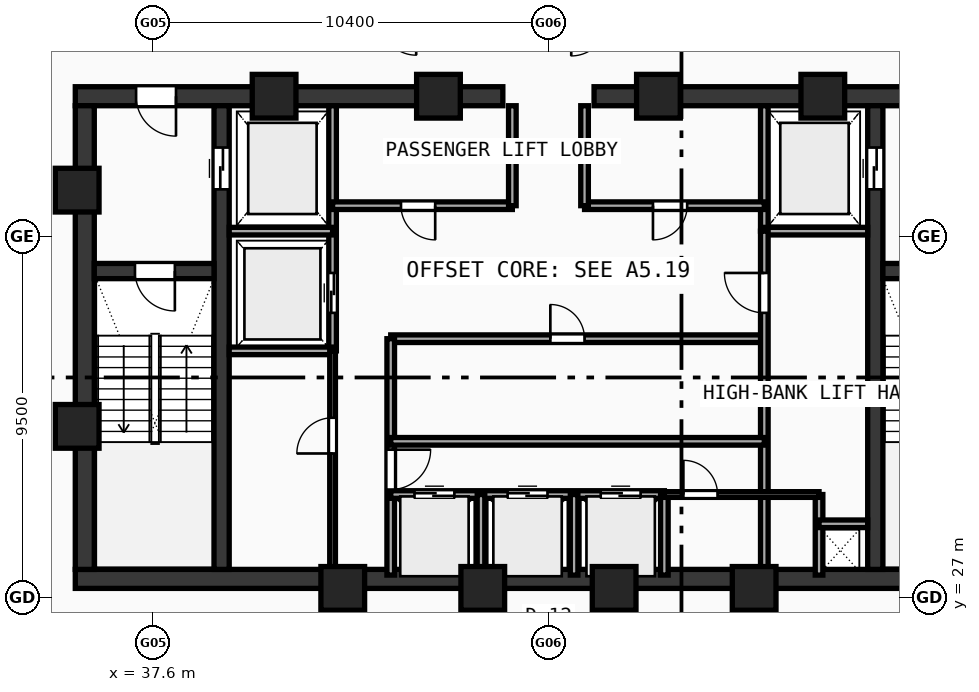
"""IFC4 building model, lengths in metres.
Left out: names, types, materials, properties, quantities, classifications, styles, units other than length and angle.
Written with IfcOpenShell. Run it as: python <this file> out.ifc"""

import sys

from ifc_helpers import new_model, si_unit, direction, frame, frame_2d, origin, origin_with_axes, origin_2d, place, context, subcontext, project, spatial, rectangle, hollow_rectangle, extrude, source, transform, mapped, element, fill, save


model = new_model("IFC4")
c1 = context("Model", 3, precision=1e-05, world=origin(), true_north=direction((0.0, 1.0)))
c2 = subcontext(c1, "Body", "Model", "MODEL_VIEW")
j1 = project(units=[si_unit("LENGTHUNIT", "METRE"), si_unit("PLANEANGLEUNIT", "RADIAN")], contexts=[c1])
p1 = place(None, origin())
s1 = spatial("IfcSite", under=j1, at=p1, CompositionType="ELEMENT")
p2 = place(p1, origin())
s2 = spatial("IfcBuilding", under=s1, at=p2, CompositionType="ELEMENT")
p3 = place(p2, frame((0.0, 0.0, 299.94)))
s3 = spatial("IfcBuildingStorey", under=s2, at=p3, CompositionType="ELEMENT", Elevation=299.94)
p4 = place(p3, frame((35.55, 27.5, 0.0), z_axis=(0.0, 0.0, 1.0), x_axis=(1.0, 0.0, 0.0)))
e1 = element("IfcWall", 1, at=p4, inside=s3, PredefinedType="SHEAR", context=c2, shape_type="SweptSolid", body=[
    extrude(rectangle(XDim=24.9, YDim=0.5, at=frame_2d((12.45, 0.0))), origin(), (0.0, 0.0, 1.0), 3.47),
])
p5 = place(p3, frame((35.55, 40.2, 0.0), z_axis=(0.0, 0.0, 1.0), x_axis=(1.0, 0.0, 0.0)))
e2 = element("IfcWall", 2, at=p5, inside=s3, PredefinedType="SHEAR", context=c2, shape_type="SweptSolid", body=[
    extrude(rectangle(XDim=11.25, YDim=0.5, at=frame_2d((5.625, 0.0))), origin(), (0.0, 0.0, 1.0), 3.47),
])
p6 = place(p5, frame((1.6, 0.0, 0.0)))
e3 = element("IfcOpeningElement", 3, at=p6, cuts=e2, PredefinedType="OPENING", context=c2, shape_type="SweptSolid", body=[
    extrude(rectangle(XDim=1.05, YDim=2.1, at=frame_2d((0.525, 1.05))), frame((0.0, 0.26, 0.0), z_axis=(0.0, -1.0, 0.0), x_axis=(1.0, 0.0, 0.0)), (0.0, 0.0, 1.0), 0.52),
])
p7 = place(p3, frame((49.2, 40.2, 0.0), z_axis=(0.0, 0.0, 1.0), x_axis=(1.0, 0.0, 0.0)))
e4 = element("IfcWall", 4, at=p7, inside=s3, PredefinedType="SHEAR", context=c2, shape_type="SweptSolid", body=[
    extrude(rectangle(XDim=11.25, YDim=0.5, at=frame_2d((5.625, 0.0))), origin(), (0.0, 0.0, 1.0), 3.47),
])
p8 = place(p7, frame((8.6, 0.0, 0.0)))
e5 = element("IfcOpeningElement", 5, at=p8, cuts=e4, PredefinedType="OPENING", context=c2, shape_type="SweptSolid", body=[
    extrude(rectangle(XDim=1.05, YDim=2.1, at=frame_2d((0.525, 1.05))), frame((0.0, 0.26, 0.0), z_axis=(0.0, -1.0, 0.0), x_axis=(1.0, 0.0, 0.0)), (0.0, 0.0, 1.0), 0.52),
])
p9 = place(p3, frame((35.8, 27.75, 0.0), z_axis=(0.0, 0.0, 1.0), x_axis=(0.0, 1.0, 0.0)))
e6 = element("IfcWall", 6, at=p9, inside=s3, PredefinedType="SHEAR", context=c2, shape_type="SweptSolid", body=[
    extrude(rectangle(XDim=12.2, YDim=0.5, at=frame_2d((6.1, 0.0))), origin(), (0.0, 0.0, 1.0), 3.47),
])
p10 = place(p3, frame((39.4, 27.75, 0.0), z_axis=(0.0, 0.0, 1.0), x_axis=(0.0, 1.0, 0.0)))
e7 = element("IfcWall", 7, at=p10, inside=s3, PredefinedType="SHEAR", context=c2, shape_type="SweptSolid", body=[
    extrude(rectangle(XDim=12.2, YDim=0.4, at=frame_2d((6.1, 0.0))), origin(), (0.0, 0.0, 1.0), 3.47),
])
p11 = place(p10, frame((10.0, 0.0, 0.0)))
e8 = element("IfcOpeningElement", 8, at=p11, cuts=e7, PredefinedType="OPENING", context=c2, shape_type="SweptSolid", body=[
    extrude(rectangle(XDim=1.1, YDim=2.1, at=frame_2d((0.55, 1.05))), frame((0.0, 0.21, 0.0), z_axis=(0.0, -1.0, 0.0), x_axis=(1.0, 0.0, 0.0)), (0.0, 0.0, 1.0), 0.42),
])
p12 = place(p3, frame((56.6, 27.75, 0.0), z_axis=(0.0, 0.0, 1.0), x_axis=(0.0, 1.0, 0.0)))
e9 = element("IfcWall", 9, at=p12, inside=s3, PredefinedType="SHEAR", context=c2, shape_type="SweptSolid", body=[
    extrude(rectangle(XDim=12.2, YDim=0.4, at=frame_2d((6.1, 0.0))), origin(), (0.0, 0.0, 1.0), 3.47),
])
p13 = place(p12, frame((10.0, 0.0, 0.0)))
e10 = element("IfcOpeningElement", 10, at=p13, cuts=e9, PredefinedType="OPENING", context=c2, shape_type="SweptSolid", body=[
    extrude(rectangle(XDim=1.1, YDim=2.1, at=frame_2d((0.55, 1.05))), frame((0.0, 0.21, 0.0), z_axis=(0.0, -1.0, 0.0), x_axis=(1.0, 0.0, 0.0)), (0.0, 0.0, 1.0), 0.42),
])
p14 = place(p3, frame((36.05, 35.6, 0.0), z_axis=(0.0, 0.0, 1.0), x_axis=(1.0, 0.0, 0.0)))
e11 = element("IfcWall", 11, at=p14, inside=s3, PredefinedType="SHEAR", context=c2, shape_type="SweptSolid", body=[
    extrude(rectangle(XDim=3.15, YDim=0.4, at=frame_2d((1.575, 0.0))), origin(), (0.0, 0.0, 1.0), 3.47),
])
p15 = place(p14, frame((1.07, 0.0, 0.0)))
e12 = element("IfcOpeningElement", 12, at=p15, cuts=e11, PredefinedType="OPENING", context=c2, shape_type="SweptSolid", body=[
    extrude(rectangle(XDim=1.05, YDim=2.1, at=frame_2d((0.525, 1.05))), frame((0.0, 0.21, 0.0), z_axis=(0.0, -1.0, 0.0), x_axis=(1.0, 0.0, 0.0)), (0.0, 0.0, 1.0), 0.42),
])
p16 = place(p3, frame((56.8, 35.6, 0.0), z_axis=(0.0, 0.0, 1.0), x_axis=(1.0, 0.0, 0.0)))
e13 = element("IfcWall", 13, at=p16, inside=s3, PredefinedType="SHEAR", context=c2, shape_type="SweptSolid", body=[
    extrude(rectangle(XDim=3.15, YDim=0.4, at=frame_2d((1.575, 0.0))), origin(), (0.0, 0.0, 1.0), 3.47),
])
p17 = place(p16, frame((1.02, 0.0, 0.0)))
e14 = element("IfcOpeningElement", 14, at=p17, cuts=e13, PredefinedType="OPENING", context=c2, shape_type="SweptSolid", body=[
    extrude(rectangle(XDim=1.05, YDim=2.1, at=frame_2d((0.525, 1.05))), frame((0.0, 0.21, 0.0), z_axis=(0.0, -1.0, 0.0), x_axis=(1.0, 0.0, 0.0)), (0.0, 0.0, 1.0), 0.42),
])
m1 = source(origin(), c2, "Body", "SweptSolid", [
    extrude(hollow_rectangle(XDim=1.15, YDim=1.15, WallThickness=0.048, at=origin_2d()), origin(), (0.0, 0.0, 1.0), 3.73),
])
for number, where, z_axis, x_axis in (
    (15, (42.588, 27.25, -0.26), (0.0, 0.0, 1.0), (1.0, 0.0, 0.0)),
    (16, (46.272, 27.25, -0.26), (0.0, 0.0, 1.0), (1.0, 0.0, 0.0)),
    (17, (49.729, 27.25, -0.26), (0.0, 0.0, 1.0), (1.0, 0.0, 0.0)),
    (18, (53.412, 27.25, -0.26), (0.0, 0.0, 1.0), (1.0, 0.0, 0.0)),
    (19, (55.219, 40.2, -0.26), (0.0, 0.0, 1.0), (1.0, 0.0, 0.0)),
    (20, (50.894, 40.2, -0.26), (0.0, 0.0, 1.0), (1.0, 0.0, 0.0)),
    (21, (45.106, 40.2, -0.26), (0.0, 0.0, 1.0), (1.0, 0.0, 0.0)),
    (22, (40.781, 40.2, -0.26), (0.0, 0.0, 1.0), (1.0, 0.0, 0.0)),
    (23, (35.6, 37.729, -0.26), (0.0, 0.0, 1.0), (1.0, 0.0, 0.0)),
    (24, (35.6, 31.513, -0.26), (0.0, 0.0, 1.0), (1.0, 0.0, 0.0)),
):
    element("IfcColumn", number, at=place(p3, frame(where, z_axis=z_axis, x_axis=x_axis)), inside=s3, PredefinedType="COLUMN", context=c2, shape_type="MappedRepresentation", body=[
        mapped(m1, transform((0.0, 0.0, 0.0), scale=1.0)),
    ])
p18 = place(p3, frame((42.32, 33.5, 0.0), z_axis=(0.0, 0.0, 1.0), x_axis=(0.0, 1.0, 0.0)))
e25 = element("IfcWall", 25, at=p18, inside=s3, PredefinedType="SOLIDWALL", context=c2, shape_type="SweptSolid", body=[
    extrude(rectangle(XDim=6.45, YDim=0.2, at=frame_2d((3.225, 0.0))), origin(), (0.0, 0.0, 1.0), 3.47),
])
p19 = place(p18, frame((1.0, 0.0, 0.0)))
e26 = element("IfcOpeningElement", 26, at=p19, cuts=e25, PredefinedType="OPENING", context=c2, shape_type="SweptSolid", body=[
    extrude(rectangle(XDim=1.05, YDim=2.1, at=frame_2d((0.525, 1.05))), frame((0.0, 0.11, 0.0), z_axis=(0.0, -1.0, 0.0), x_axis=(1.0, 0.0, 0.0)), (0.0, 0.0, 1.0), 0.22),
])
for number, where, z_axis, x_axis in (
    (27, (39.6, 36.65, 0.0), (0.0, 0.0, 1.0), (1.0, 0.0, 0.0)),
    (28, (39.6, 33.5, 0.0), (0.0, 0.0, 1.0), (1.0, 0.0, 0.0)),
):
    element("IfcWall", number, at=place(p3, frame(where, z_axis=z_axis, x_axis=x_axis)), inside=s3, PredefinedType="SOLIDWALL", context=c2, shape_type="SweptSolid", body=[
        extrude(rectangle(XDim=2.72, YDim=0.2, at=frame_2d((1.36, 0.0))), origin(), (0.0, 0.0, 1.0), 3.47),
    ])
p20 = place(p3, frame((53.68, 36.65, 0.0), z_axis=(0.0, 0.0, 1.0), x_axis=(0.0, 1.0, 0.0)))
e29 = element("IfcWall", 29, at=p20, inside=s3, PredefinedType="SOLIDWALL", context=c2, shape_type="SweptSolid", body=[
    extrude(rectangle(XDim=3.3, YDim=0.2, at=frame_2d((1.65, 0.0))), origin(), (0.0, 0.0, 1.0), 3.47),
])
p21 = place(p3, frame((53.68, 36.65, 0.0), z_axis=(0.0, 0.0, 1.0), x_axis=(1.0, 0.0, 0.0)))
e30 = element("IfcWall", 30, at=p21, inside=s3, PredefinedType="SOLIDWALL", context=c2, shape_type="SweptSolid", body=[
    extrude(rectangle(XDim=2.72, YDim=0.2, at=frame_2d((1.36, 0.0))), origin(), (0.0, 0.0, 1.0), 3.47),
])
p22 = place(p3, frame((42.32, 37.32, 0.0), z_axis=(0.0, 0.0, 1.0), x_axis=(1.0, 0.0, 0.0)))
e31 = element("IfcWall", 31, at=p22, inside=s3, PredefinedType="SOLIDWALL", context=c2, shape_type="SweptSolid", body=[
    extrude(rectangle(XDim=4.73, YDim=0.2, at=frame_2d((2.365, 0.0))), origin(), (0.0, 0.0, 1.0), 3.47),
])
p23 = place(p22, frame((1.8, 0.0, 0.0)))
e32 = element("IfcOpeningElement", 32, at=p23, cuts=e31, PredefinedType="OPENING", context=c2, shape_type="SweptSolid", body=[
    extrude(rectangle(XDim=0.9, YDim=2.1, at=frame_2d((0.45, 1.05))), frame((0.0, 0.11, 0.0), z_axis=(0.0, -1.0, 0.0), x_axis=(1.0, 0.0, 0.0)), (0.0, 0.0, 1.0), 0.22),
])
p24 = place(p3, frame((48.95, 37.32, 0.0), z_axis=(0.0, 0.0, 1.0), x_axis=(1.0, 0.0, 0.0)))
e33 = element("IfcWall", 33, at=p24, inside=s3, PredefinedType="SOLIDWALL", context=c2, shape_type="SweptSolid", body=[
    extrude(rectangle(XDim=4.73, YDim=0.2, at=frame_2d((2.365, 0.0))), origin(), (0.0, 0.0, 1.0), 3.47),
])
p25 = place(p24, frame((1.8, 0.0, 0.0)))
e34 = element("IfcOpeningElement", 34, at=p25, cuts=e33, PredefinedType="OPENING", context=c2, shape_type="SweptSolid", body=[
    extrude(rectangle(XDim=0.9, YDim=2.1, at=frame_2d((0.45, 1.05))), frame((0.0, 0.11, 0.0), z_axis=(0.0, -1.0, 0.0), x_axis=(1.0, 0.0, 0.0)), (0.0, 0.0, 1.0), 0.22),
])
for number, where, z_axis, x_axis in (
    (35, (47.05, 37.32, 0.0), (0.0, 0.0, 1.0), (0.0, 1.0, 0.0)),
    (36, (48.95, 37.32, 0.0), (0.0, 0.0, 1.0), (0.0, 1.0, 0.0)),
):
    element("IfcWall", number, at=place(p3, frame(where, z_axis=z_axis, x_axis=x_axis)), inside=s3, PredefinedType="SOLIDWALL", context=c2, shape_type="SweptSolid", body=[
        extrude(rectangle(XDim=2.63, YDim=0.2, at=frame_2d((1.315, 0.0))), origin(), (0.0, 0.0, 1.0), 3.47),
    ])
p26 = place(p3, frame((43.85, 33.82, 0.0), z_axis=(0.0, 0.0, 1.0), x_axis=(1.0, 0.0, 0.0)))
e37 = element("IfcWall", 37, at=p26, inside=s3, PredefinedType="SOLIDWALL", context=c2, shape_type="SweptSolid", body=[
    extrude(rectangle(XDim=9.83, YDim=0.2, at=frame_2d((4.915, 0.0))), origin(), (0.0, 0.0, 1.0), 3.47),
])
p27 = place(p26, frame((4.2, 0.0, 0.0)))
e38 = element("IfcOpeningElement", 38, at=p27, cuts=e37, PredefinedType="OPENING", context=c2, shape_type="SweptSolid", body=[
    extrude(rectangle(XDim=0.9, YDim=2.1, at=frame_2d((0.45, 1.05))), frame((0.0, 0.11, 0.0), z_axis=(0.0, -1.0, 0.0), x_axis=(1.0, 0.0, 0.0)), (0.0, 0.0, 1.0), 0.22),
])
p28 = place(p3, frame((43.85, 27.6, 0.0), z_axis=(0.0, 0.0, 1.0), x_axis=(0.0, 1.0, 0.0)))
e39 = element("IfcWall", 39, at=p28, inside=s3, PredefinedType="SOLIDWALL", context=c2, shape_type="SweptSolid", body=[
    extrude(rectangle(XDim=6.22, YDim=0.2, at=frame_2d((3.11, 0.0))), origin(), (0.0, 0.0, 1.0), 3.47),
])
p29 = place(p28, frame((2.25, 0.0, 0.0)))
e40 = element("IfcOpeningElement", 40, at=p29, cuts=e39, PredefinedType="OPENING", context=c2, shape_type="SweptSolid", body=[
    extrude(rectangle(XDim=1.05, YDim=2.1, at=frame_2d((0.525, 1.05))), frame((0.0, 0.11, 0.0), z_axis=(0.0, -1.0, 0.0), x_axis=(1.0, 0.0, 0.0)), (0.0, 0.0, 1.0), 0.22),
])
p30 = place(p3, frame((53.68, 27.6, 0.0), z_axis=(0.0, 0.0, 1.0), x_axis=(0.0, 1.0, 0.0)))
e41 = element("IfcWall", 41, at=p30, inside=s3, PredefinedType="SOLIDWALL", context=c2, shape_type="SweptSolid", body=[
    extrude(rectangle(XDim=9.05, YDim=0.2, at=frame_2d((4.525, 0.0))), origin(), (0.0, 0.0, 1.0), 3.47),
])
p31 = place(p30, frame((6.9, 0.0, 0.0)))
e42 = element("IfcOpeningElement", 42, at=p31, cuts=e41, PredefinedType="OPENING", context=c2, shape_type="SweptSolid", body=[
    extrude(rectangle(XDim=1.05, YDim=2.1, at=frame_2d((0.525, 1.05))), frame((0.0, 0.11, 0.0), z_axis=(0.0, -1.0, 0.0), x_axis=(1.0, 0.0, 0.0)), (0.0, 0.0, 1.0), 0.22),
])
p32 = place(p3, frame((43.85, 29.72, 0.0), z_axis=(0.0, 0.0, 1.0), x_axis=(1.0, 0.0, 0.0)))
e43 = element("IfcWall", 43, at=p32, inside=s3, PredefinedType="SOLIDWALL", context=c2, shape_type="SweptSolid", body=[
    extrude(rectangle(XDim=7.2, YDim=0.2, at=frame_2d((3.6, 0.0))), origin(), (0.0, 0.0, 1.0), 3.47),
])
p33 = place(p32, frame((0.625, 0.0, 0.0)))
e44 = element("IfcOpeningElement", 44, at=p33, cuts=e43, PredefinedType="OPENING", context=c2, shape_type="SweptSolid", body=[
    extrude(rectangle(XDim=1.05, YDim=2.1, at=frame_2d((0.525, 1.05))), frame((0.0, 0.11, 0.0), z_axis=(0.0, -1.0, 0.0), x_axis=(1.0, 0.0, 0.0)), (0.0, 0.0, 1.0), 0.22),
])
p34 = place(p32, frame((3.075, 0.0, 0.0)))
e45 = element("IfcOpeningElement", 45, at=p34, cuts=e43, PredefinedType="OPENING", context=c2, shape_type="SweptSolid", body=[
    extrude(rectangle(XDim=1.05, YDim=2.1, at=frame_2d((0.525, 1.05))), frame((0.0, 0.11, 0.0), z_axis=(0.0, -1.0, 0.0), x_axis=(1.0, 0.0, 0.0)), (0.0, 0.0, 1.0), 0.22),
])
p35 = place(p32, frame((5.525, 0.0, 0.0)))
e46 = element("IfcOpeningElement", 46, at=p35, cuts=e43, PredefinedType="OPENING", context=c2, shape_type="SweptSolid", body=[
    extrude(rectangle(XDim=1.05, YDim=2.1, at=frame_2d((0.525, 1.05))), frame((0.0, 0.11, 0.0), z_axis=(0.0, -1.0, 0.0), x_axis=(1.0, 0.0, 0.0)), (0.0, 0.0, 1.0), 0.22),
])
p36 = place(p3, frame((51.05, 27.6, 0.0), z_axis=(0.0, 0.0, 1.0), x_axis=(0.0, 1.0, 0.0)))
e47 = element("IfcWall", 47, at=p36, inside=s3, PredefinedType="SOLIDWALL", context=c2, shape_type="SweptSolid", body=[
    extrude(rectangle(XDim=2.12, YDim=0.2, at=frame_2d((1.06, 0.0))), origin(), (0.0, 0.0, 1.0), 3.47),
])
p37 = place(p3, frame((43.85, 31.12, 0.0), z_axis=(0.0, 0.0, 1.0), x_axis=(1.0, 0.0, 0.0)))
e48 = element("IfcWall", 48, at=p37, inside=s3, PredefinedType="SOLIDWALL", context=c2, shape_type="SweptSolid", body=[
    extrude(rectangle(XDim=9.83, YDim=0.2, at=frame_2d((4.915, 0.0))), origin(), (0.0, 0.0, 1.0), 3.47),
])
for number, where, z_axis, x_axis in (
    (49, (46.225, 27.6, 0.0), (0.0, 0.0, 1.0), (0.0, 1.0, 0.0)),
    (50, (48.675, 27.6, 0.0), (0.0, 0.0, 1.0), (0.0, 1.0, 0.0)),
    (51, (55.12, 27.6, 0.0), (0.0, 0.0, 1.0), (0.0, 1.0, 0.0)),
):
    element("IfcWall", number, at=place(p3, frame(where, z_axis=z_axis, x_axis=x_axis)), inside=s3, PredefinedType="SOLIDWALL", context=c2, shape_type="SweptSolid", body=[
        extrude(rectangle(XDim=2.12, YDim=0.2, at=frame_2d((1.06, 0.0))), origin(), (0.0, 0.0, 1.0), 3.47),
    ])
p38 = place(p3, frame((55.12, 28.95, 0.0), z_axis=(0.0, 0.0, 1.0), x_axis=(1.0, 0.0, 0.0)))
e52 = element("IfcWall", 52, at=p38, inside=s3, PredefinedType="SOLIDWALL", context=c2, shape_type="SweptSolid", body=[
    extrude(rectangle(XDim=1.28, YDim=0.2, at=frame_2d((0.64, 0.0))), origin(), (0.0, 0.0, 1.0), 3.47),
])
p39 = place(p3, frame((42.32, 27.6, 0.0), z_axis=(0.0, 0.0, 1.0), x_axis=(0.0, 1.0, 0.0)))
e53 = element("IfcWall", 53, at=p39, inside=s3, PredefinedType="PARTITIONING", context=c2, shape_type="SweptSolid", body=[
    extrude(rectangle(XDim=5.9, YDim=0.15, at=frame_2d((2.95, 0.0))), origin(), (0.0, 0.0, 1.0), 3.47),
])
p40 = place(p39, frame((3.2, 0.0, 0.0)))
e54 = element("IfcOpeningElement", 54, at=p40, cuts=e53, PredefinedType="OPENING", context=c2, shape_type="SweptSolid", body=[
    extrude(rectangle(XDim=0.94, YDim=2.1, at=frame_2d((0.47, 1.05))), frame((0.0, 0.085, 0.0), z_axis=(0.0, -1.0, 0.0), x_axis=(1.0, 0.0, 0.0)), (0.0, 0.0, 1.0), 0.17),
])
p41 = place(p3, frame((51.05, 29.72, 0.0), z_axis=(0.0, 0.0, 1.0), x_axis=(1.0, 0.0, 0.0)))
e55 = element("IfcWall", 55, at=p41, inside=s3, PredefinedType="PARTITIONING", context=c2, shape_type="SweptSolid", body=[
    extrude(rectangle(XDim=4.07, YDim=0.15, at=frame_2d((2.035, 0.0))), origin(), (0.0, 0.0, 1.0), 3.47),
])
p42 = place(p41, frame((0.5, 0.0, 0.0)))
e56 = element("IfcOpeningElement", 56, at=p42, cuts=e55, PredefinedType="OPENING", context=c2, shape_type="SweptSolid", body=[
    extrude(rectangle(XDim=0.9, YDim=2.1, at=frame_2d((0.45, 1.05))), frame((0.0, 0.085, 0.0), z_axis=(0.0, -1.0, 0.0), x_axis=(1.0, 0.0, 0.0)), (0.0, 0.0, 1.0), 0.17),
])
m2 = source(origin(), c2, "Body", "SweptSolid", [
    extrude(rectangle(XDim=1.05, YDim=2.1, at=frame_2d((0.525, 1.05))), frame((0.0, 0.025, 0.0), z_axis=(0.0, -1.0, 0.0), x_axis=(1.0, 0.0, 0.0)), (0.0, 0.0, 1.0), 0.05),
])
p43 = place(p15, frame((1.05, 0.0, 0.0), z_axis=(0.0, 0.0, 1.0), x_axis=(-1.0, 0.0, 0.0)))
e57 = element("IfcDoor", 57, at=p43, inside=s3, OperationType="SINGLE_SWING_LEFT", PredefinedType="DOOR", context=c2, shape_type="MappedRepresentation", body=[
    mapped(m2, transform((0.0, 0.0, 0.0), scale=1.0)),
])
fill(e12, e57)
p44 = place(p6, frame((1.05, 0.0, 0.0), z_axis=(0.0, 0.0, 1.0), x_axis=(-1.0, 0.0, 0.0)))
e58 = element("IfcDoor", 58, at=p44, inside=s3, OperationType="SINGLE_SWING_LEFT", PredefinedType="DOOR", context=c2, shape_type="MappedRepresentation", body=[
    mapped(m2, transform((0.0, 0.0, 0.0), scale=1.0)),
])
fill(e3, e58)
m3 = source(origin(), c2, "Body", "SweptSolid", [
    extrude(rectangle(XDim=1.1, YDim=2.1, at=frame_2d((0.55, 1.05))), frame((0.0, 0.025, 0.0), z_axis=(0.0, -1.0, 0.0), x_axis=(1.0, 0.0, 0.0)), (0.0, 0.0, 1.0), 0.05),
])
p45 = place(p11, frame((1.1, 0.0, 0.0), z_axis=(0.0, 0.0, 1.0), x_axis=(-1.0, 0.0, 0.0)))
e59 = element("IfcDoor", 59, at=p45, inside=s3, OperationType="DOUBLE_DOOR_SLIDING", PredefinedType="DOOR", context=c2, shape_type="MappedRepresentation", body=[
    mapped(m3, transform((0.0, 0.0, 0.0), scale=1.0)),
])
fill(e8, e59)
p46 = place(p13, origin_with_axes())
e60 = element("IfcDoor", 60, at=p46, inside=s3, OperationType="DOUBLE_DOOR_SLIDING", PredefinedType="DOOR", context=c2, shape_type="MappedRepresentation", body=[
    mapped(m3, transform((0.0, 0.0, 0.0), scale=1.0)),
])
fill(e10, e60)
p47 = place(p19, origin_with_axes())
e61 = element("IfcDoor", 61, at=p47, inside=s3, OperationType="DOUBLE_DOOR_SLIDING", PredefinedType="DOOR", context=c2, shape_type="MappedRepresentation", body=[
    mapped(m2, transform((0.0, 0.0, 0.0), scale=1.0)),
])
fill(e26, e61)
m4 = source(origin(), c2, "Body", "SweptSolid", [
    extrude(rectangle(XDim=0.9, YDim=2.1, at=frame_2d((0.45, 1.05))), frame((0.0, 0.025, 0.0), z_axis=(0.0, -1.0, 0.0), x_axis=(1.0, 0.0, 0.0)), (0.0, 0.0, 1.0), 0.05),
])
p48 = place(p23, frame((0.9, 0.0, 0.0), z_axis=(0.0, 0.0, 1.0), x_axis=(-1.0, 0.0, 0.0)))
e62 = element("IfcDoor", 62, at=p48, inside=s3, OperationType="SINGLE_SWING_LEFT", PredefinedType="DOOR", context=c2, shape_type="MappedRepresentation", body=[
    mapped(m4, transform((0.0, 0.0, 0.0), scale=1.0)),
])
fill(e32, e62)
p49 = place(p25, frame((0.9, 0.0, 0.0), z_axis=(0.0, 0.0, 1.0), x_axis=(-1.0, 0.0, 0.0)))
e63 = element("IfcDoor", 63, at=p49, inside=s3, OperationType="SINGLE_SWING_RIGHT", PredefinedType="DOOR", context=c2, shape_type="MappedRepresentation", body=[
    mapped(m4, transform((0.0, 0.0, 0.0), scale=1.0)),
])
fill(e34, e63)
p50 = place(p27, origin_with_axes())
e64 = element("IfcDoor", 64, at=p50, inside=s3, OperationType="SINGLE_SWING_LEFT", PredefinedType="DOOR", context=c2, shape_type="MappedRepresentation", body=[
    mapped(m4, transform((0.0, 0.0, 0.0), scale=1.0)),
])
fill(e38, e64)
p51 = place(p29, frame((1.05, 0.0, 0.0), z_axis=(0.0, 0.0, 1.0), x_axis=(-1.0, 0.0, 0.0)))
e65 = element("IfcDoor", 65, at=p51, inside=s3, OperationType="SINGLE_SWING_LEFT", PredefinedType="DOOR", context=c2, shape_type="MappedRepresentation", body=[
    mapped(m2, transform((0.0, 0.0, 0.0), scale=1.0)),
])
fill(e40, e65)
p52 = place(p31, origin_with_axes())
e66 = element("IfcDoor", 66, at=p52, inside=s3, OperationType="SINGLE_SWING_RIGHT", PredefinedType="DOOR", context=c2, shape_type="MappedRepresentation", body=[
    mapped(m2, transform((0.0, 0.0, 0.0), scale=1.0)),
])
fill(e42, e66)
p53 = place(p33, origin_with_axes())
e67 = element("IfcDoor", 67, at=p53, inside=s3, OperationType="DOUBLE_DOOR_SLIDING", PredefinedType="DOOR", context=c2, shape_type="MappedRepresentation", body=[
    mapped(m2, transform((0.0, 0.0, 0.0), scale=1.0)),
])
fill(e44, e67)
p54 = place(p34, origin_with_axes())
e68 = element("IfcDoor", 68, at=p54, inside=s3, OperationType="DOUBLE_DOOR_SLIDING", PredefinedType="DOOR", context=c2, shape_type="MappedRepresentation", body=[
    mapped(m2, transform((0.0, 0.0, 0.0), scale=1.0)),
])
fill(e45, e68)
p55 = place(p35, origin_with_axes())
e69 = element("IfcDoor", 69, at=p55, inside=s3, OperationType="DOUBLE_DOOR_SLIDING", PredefinedType="DOOR", context=c2, shape_type="MappedRepresentation", body=[
    mapped(m2, transform((0.0, 0.0, 0.0), scale=1.0)),
])
fill(e46, e69)
m5 = source(origin(), c2, "Body", "SweptSolid", [
    extrude(rectangle(XDim=0.94, YDim=2.1, at=frame_2d((0.47, 1.05))), frame((0.0, 0.025, 0.0), z_axis=(0.0, -1.0, 0.0), x_axis=(1.0, 0.0, 0.0)), (0.0, 0.0, 1.0), 0.05),
])
p56 = place(p40, origin_with_axes())
e70 = element("IfcDoor", 70, at=p56, inside=s3, OperationType="SINGLE_SWING_LEFT", PredefinedType="DOOR", context=c2, shape_type="MappedRepresentation", body=[
    mapped(m5, transform((0.0, 0.0, 0.0), scale=1.0)),
])
fill(e54, e70)
p57 = place(p42, origin_with_axes())
e71 = element("IfcDoor", 71, at=p57, inside=s3, OperationType="SINGLE_SWING_LEFT", PredefinedType="DOOR", context=c2, shape_type="MappedRepresentation", body=[
    mapped(m4, transform((0.0, 0.0, 0.0), scale=1.0)),
])
fill(e56, e71)
save(model, sys.argv[1])
